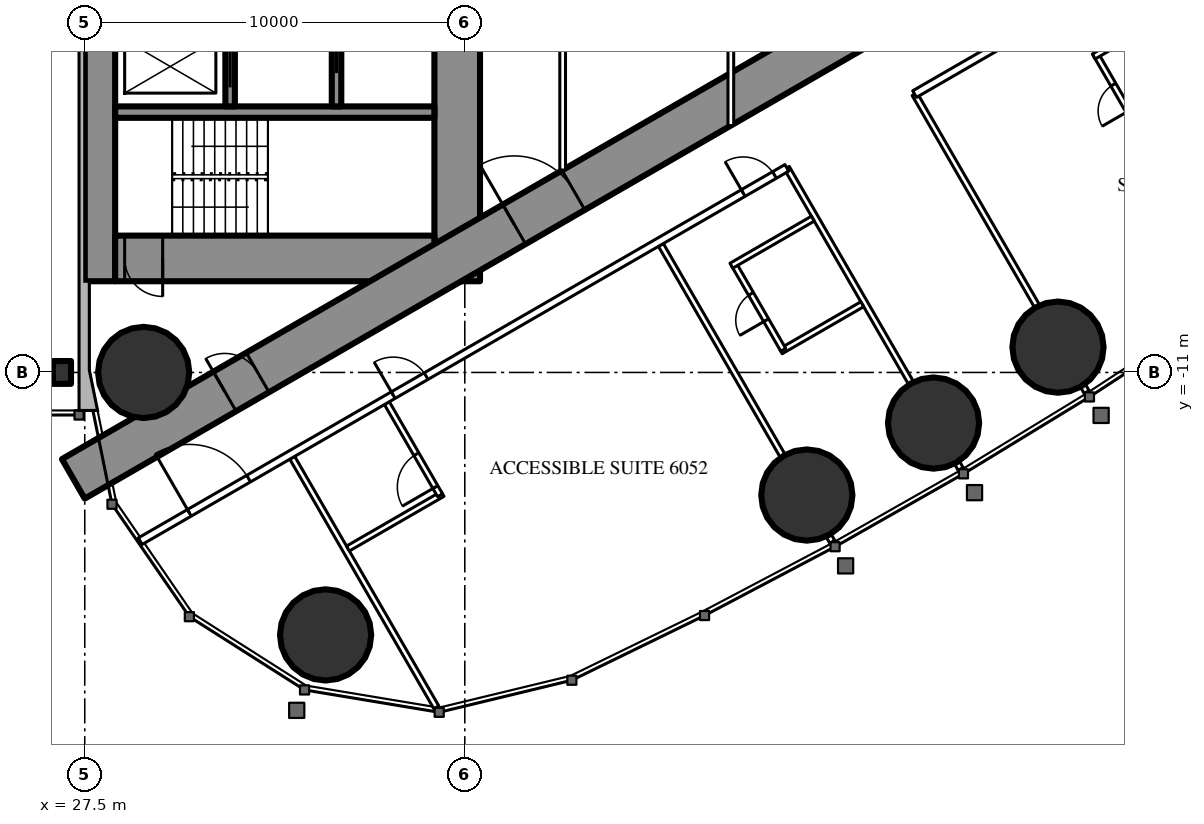
"""IFC4 building model, lengths in metres.
Left out: names, types, materials, properties, quantities, classifications, styles, units other than length and angle.
Written with IfcOpenShell. Run it as: python <this file> out.ifc"""

import sys

from ifc_helpers import new_model, si_unit, direction, frame, frame_2d, origin, origin_2d, place, context, subcontext, project, spatial, rectangle, circle, i_section, extrude, element, fill, save


model = new_model("IFC4")
c1 = context("Model", 3, precision=1e-05, world=origin(), true_north=direction((0.0, 1.0)))
c2 = subcontext(c1, "Body", "Model", "MODEL_VIEW")
j1 = project(units=[si_unit("LENGTHUNIT", "METRE"), si_unit("PLANEANGLEUNIT", "RADIAN")], contexts=[c1])
p1 = place(None, origin())
s1 = spatial("IfcSite", under=j1, at=p1, CompositionType="ELEMENT")
p2 = place(p1, origin())
s2 = spatial("IfcBuilding", under=s1, at=p2, CompositionType="ELEMENT")
p3 = place(p2, frame((0.0, 0.0, 226.1)))
s3 = spatial("IfcBuildingStorey", under=s2, at=p3, CompositionType="ELEMENT", Elevation=226.1)
for number, where, z_axis, x_axis in (
    (1, (33.837, -17.906, 0.0), (0.0, 0.0, 1.0), (1.0, 0.0, 0.0)),
    (2, (29.05, -11.0, 0.0), (0.0, 0.0, 1.0), (1.0, 0.0, 0.0)),
    (3, (46.499, -14.226, 0.0), (0.0, 0.0, 1.0), (1.0, 0.0, 0.0)),
    (4, (49.834, -12.332, 0.0), (0.0, 0.0, 1.0), (1.0, 0.0, 0.0)),
    (5, (53.108, -10.334, 0.0), (0.0, 0.0, 1.0), (1.0, 0.0, 0.0)),
):
    element("IfcColumn", number, at=place(p3, frame(where, z_axis=z_axis, x_axis=x_axis)), inside=s3, PredefinedType="COLUMN", context=c2, shape_type="SweptSolid", body=[
        extrude(circle(Radius=1.2, at=origin_2d()), origin(), (0.0, 0.0, 1.0), 3.6),
    ])
p4 = place(p3, frame((27.9, -8.6, 0.0), z_axis=(0.0, 0.0, 1.0), x_axis=(0.0, 1.0, 0.0)))
e6 = element("IfcWall", 6, at=p4, inside=s3, PredefinedType="SHEAR", context=c2, shape_type="SweptSolid", body=[
    extrude(rectangle(XDim=17.2, YDim=0.8, at=frame_2d((8.6, 0.0))), origin(), (0.0, 0.0, 1.0), 3.6),
])
p5 = place(p4, frame((9.35, 0.0, 0.0)))
e7 = element("IfcOpeningElement", 7, at=p5, cuts=e6, PredefinedType="OPENING", context=c2, shape_type="SweptSolid", body=[
    extrude(rectangle(XDim=0.9, YDim=2.2, at=frame_2d((0.45, 1.1))), frame((0.0, 0.41, 0.0), z_axis=(0.0, -1.0, 0.0), x_axis=(1.0, 0.0, 0.0)), (0.0, 0.0, 1.0), 0.82),
])
p6 = place(p3, frame((37.3, -8.6, 0.0), z_axis=(0.0, 0.0, 1.0), x_axis=(0.0, 1.0, 0.0)))
e8 = element("IfcWall", 8, at=p6, inside=s3, PredefinedType="SHEAR", context=c2, shape_type="SweptSolid", body=[
    extrude(rectangle(XDim=17.2, YDim=1.2, at=frame_2d((8.6, 0.0))), origin(), (0.0, 0.0, 1.0), 3.6),
])
p7 = place(p6, frame((7.7, 0.0, 0.0)))
e9 = element("IfcOpeningElement", 9, at=p7, cuts=e8, PredefinedType="OPENING", context=c2, shape_type="SweptSolid", body=[
    extrude(rectangle(XDim=1.8, YDim=2.2, at=frame_2d((0.9, 1.1))), frame((0.0, 0.61, 0.0), z_axis=(0.0, -1.0, 0.0), x_axis=(1.0, 0.0, 0.0)), (0.0, 0.0, 1.0), 1.22),
])
p8 = place(p3, frame((28.3, -8.0, 0.0), z_axis=(0.0, 0.0, 1.0), x_axis=(1.0, 0.0, 0.0)))
e10 = element("IfcWall", 10, at=p8, inside=s3, PredefinedType="SHEAR", context=c2, shape_type="SweptSolid", body=[
    extrude(rectangle(XDim=8.4, YDim=1.2, at=frame_2d((4.2, 0.0))), origin(), (0.0, 0.0, 1.0), 3.6),
])
p9 = place(p8, frame((0.25, 0.0, 0.0)))
e11 = element("IfcOpeningElement", 11, at=p9, cuts=e10, PredefinedType="OPENING", context=c2, shape_type="SweptSolid", body=[
    extrude(rectangle(XDim=1.0, YDim=2.2, at=frame_2d((0.5, 1.1))), frame((0.0, 0.61, 0.0), z_axis=(0.0, -1.0, 0.0), x_axis=(1.0, 0.0, 0.0)), (0.0, 0.0, 1.0), 1.22),
])
p10 = place(p3, frame((28.3, -4.15, 0.0), z_axis=(0.0, 0.0, 1.0), x_axis=(1.0, 0.0, 0.0)))
e12 = element("IfcWall", 12, at=p10, inside=s3, PredefinedType="SHEAR", context=c2, shape_type="SweptSolid", body=[
    extrude(rectangle(XDim=8.4, YDim=0.3, at=frame_2d((4.2, 0.0))), origin(), (0.0, 0.0, 1.0), 3.6),
])
p11 = place(p3, frame((31.325, -4.0, 0.0), z_axis=(0.0, 0.0, 1.0), x_axis=(0.0, 1.0, 0.0)))
e13 = element("IfcWall", 13, at=p11, inside=s3, PredefinedType="SHEAR", context=c2, shape_type="SweptSolid", body=[
    extrude(rectangle(XDim=2.1, YDim=0.25, at=frame_2d((1.05, 0.0))), origin(), (0.0, 0.0, 1.0), 3.6),
])
p12 = place(p11, frame((0.5, 0.0, 0.0)))
e14 = element("IfcOpeningElement", 14, at=p12, cuts=e13, PredefinedType="OPENING", context=c2, shape_type="SweptSolid", body=[
    extrude(rectangle(XDim=1.1, YDim=2.2, at=frame_2d((0.55, 1.1))), frame((0.0, 0.135, 0.0), z_axis=(0.0, -1.0, 0.0), x_axis=(1.0, 0.0, 0.0)), (0.0, 0.0, 1.0), 0.27),
])
p13 = place(p3, frame((34.125, -4.0, 0.0), z_axis=(0.0, 0.0, 1.0), x_axis=(0.0, 1.0, 0.0)))
e15 = element("IfcWall", 15, at=p13, inside=s3, PredefinedType="SHEAR", context=c2, shape_type="SweptSolid", body=[
    extrude(rectangle(XDim=2.35, YDim=0.25, at=frame_2d((1.175, 0.0))), origin(), (0.0, 0.0, 1.0), 3.6),
])
p14 = place(p13, frame((0.875, 0.0, 0.0)))
e16 = element("IfcOpeningElement", 16, at=p14, cuts=e15, PredefinedType="OPENING", context=c2, shape_type="SweptSolid", body=[
    extrude(rectangle(XDim=0.6, YDim=2.0, at=frame_2d((0.3, 1.0))), frame((0.0, 0.135, 0.0), z_axis=(0.0, -1.0, 0.0), x_axis=(1.0, 0.0, 0.0)), (0.0, 0.0, 1.0), 0.27),
])
p15 = place(p3, frame((27.2, -13.8, 0.0), z_axis=(0.0, 0.0, 1.0), x_axis=(0.866027159892, 0.499996958321, 0.0)))
e17 = element("IfcWall", 17, at=p15, inside=s3, PredefinedType="SHEAR", context=c2, shape_type="SweptSolid", body=[
    extrude(rectangle(XDim=27.947, YDim=1.2, at=frame_2d((13.973, 0.0))), origin(), (0.0, 0.0, 1.0), 3.6),
])
p16 = place(p15, frame((4.6, 0.0, 0.0)))
e18 = element("IfcOpeningElement", 18, at=p16, cuts=e17, PredefinedType="OPENING", context=c2, shape_type="SweptSolid", body=[
    extrude(rectangle(XDim=1.0, YDim=2.2, at=frame_2d((0.5, 1.1))), frame((0.0, 0.61, 0.0), z_axis=(0.0, -1.0, 0.0), x_axis=(1.0, 0.0, 0.0)), (0.0, 0.0, 1.0), 1.22),
])
p17 = place(p15, frame((13.395, 0.0, 0.0)))
e19 = element("IfcOpeningElement", 19, at=p17, cuts=e17, PredefinedType="OPENING", context=c2, shape_type="SweptSolid", body=[
    extrude(rectangle(XDim=1.8, YDim=2.2, at=frame_2d((0.9, 1.1))), frame((0.0, 0.61, 0.0), z_axis=(0.0, -1.0, 0.0), x_axis=(1.0, 0.0, 0.0)), (0.0, 0.0, 1.0), 1.22),
])
p18 = place(p3, frame((26.9, -11.0, 0.0), z_axis=(0.0, 0.0, 1.0), x_axis=(1.0, 0.0, 0.0)))
e20 = element("IfcColumn", 20, at=p18, inside=s3, PredefinedType="COLUMN", context=c2, shape_type="SweptSolid", body=[
    extrude(i_section(OverallWidth=0.476, OverallDepth=0.6, WebThickness=0.1, FlangeThickness=0.14, FilletRadius=0.02, at=origin_2d()), origin(), (0.0, 0.0, 1.0), 3.6),
])
p19 = place(p3, frame((32.96, -13.246, 0.0), z_axis=(0.0, 0.0, 1.0), x_axis=(0.500000236886, -0.866025267018, 0.0)))
e21 = element("IfcWall", 21, at=p19, inside=s3, PredefinedType="PARTITIONING", context=c2, shape_type="SweptSolid", body=[
    extrude(rectangle(XDim=7.583, YDim=0.15, at=frame_2d((3.791, 0.0))), origin(), (0.0, 0.0, 1.0), 3.35),
])
p20 = place(p3, frame((42.66, -7.646, 0.0), z_axis=(0.0, 0.0, 1.0), x_axis=(0.499996592859, -0.866027370889, 0.0)))
e22 = element("IfcWall", 22, at=p20, inside=s3, PredefinedType="PARTITIONING", context=c2, shape_type="SweptSolid", body=[
    extrude(rectangle(XDim=6.398, YDim=0.15, at=frame_2d((3.199, 0.0))), origin(), (0.0, 0.0, 1.0), 2.45),
])
p21 = place(p3, frame((47.079, -15.3, 0.0), z_axis=(0.0, 0.0, 1.0), x_axis=(0.499212083968, -0.866479829667, 0.0)))
e23 = element("IfcWall", 23, at=p21, inside=s3, PredefinedType="PARTITIONING", context=c2, shape_type="SweptSolid", body=[
    extrude(rectangle(XDim=0.179, YDim=0.15, at=frame_2d((0.09, 0.0))), origin(), (0.0, 0.0, 1.0), 2.45),
])
p22 = place(p3, frame((45.973, -5.617, 0.0), z_axis=(0.0, 0.0, 1.0), x_axis=(0.499985856986, -0.866033569104, 0.0)))
e24 = element("IfcWall", 24, at=p22, inside=s3, PredefinedType="PARTITIONING", context=c2, shape_type="SweptSolid", body=[
    extrude(rectangle(XDim=6.526, YDim=0.15, at=frame_2d((3.263, 0.0))), origin(), (0.0, 0.0, 1.0), 2.45),
])
p23 = place(p3, frame((50.456, -13.382, 0.0), z_axis=(0.0, 0.0, 1.0), x_axis=(0.500661834965, -0.865642955848, 0.0)))
e25 = element("IfcWall", 25, at=p23, inside=s3, PredefinedType="PARTITIONING", context=c2, shape_type="SweptSolid", body=[
    extrude(rectangle(XDim=0.18, YDim=0.15, at=frame_2d((0.09, 0.0))), origin(), (0.0, 0.0, 1.0), 2.45),
])
p24 = place(p3, frame((49.335, -3.676, 0.0), z_axis=(0.0, 0.0, 1.0), x_axis=(0.500000613642, -0.866025049498, 0.0)))
e26 = element("IfcWall", 26, at=p24, inside=s3, PredefinedType="PARTITIONING", context=c2, shape_type="SweptSolid", body=[
    extrude(rectangle(XDim=6.433, YDim=0.15, at=frame_2d((3.216, 0.0))), origin(), (0.0, 0.0, 1.0), 2.45),
])
p25 = place(p3, frame((53.771, -11.36, 0.0), z_axis=(0.0, 0.0, 1.0), x_axis=(0.499524978789, -0.866299483762, 0.0)))
e27 = element("IfcWall", 27, at=p25, inside=s3, PredefinedType="PARTITIONING", context=c2, shape_type="SweptSolid", body=[
    extrude(rectangle(XDim=0.178, YDim=0.15, at=frame_2d((0.089, 0.0))), origin(), (0.0, 0.0, 1.0), 2.45),
])
p26 = place(p3, frame((34.425, -15.633, 0.0), z_axis=(0.0, 0.0, 1.0), x_axis=(0.866018712932, 0.500011588718, 0.0)))
e28 = element("IfcWall", 28, at=p26, inside=s3, PredefinedType="PARTITIONING", context=c2, shape_type="SweptSolid", body=[
    extrude(rectangle(XDim=2.875, YDim=0.15, at=frame_2d((1.438, 0.0))), origin(), (0.0, 0.0, 1.0), 3.35),
])
p27 = place(p3, frame((35.45, -11.808, 0.0), z_axis=(0.0, 0.0, 1.0), x_axis=(0.49994636267, -0.866056369097, 0.0)))
e29 = element("IfcWall", 29, at=p27, inside=s3, PredefinedType="PARTITIONING", context=c2, shape_type="SweptSolid", body=[
    extrude(rectangle(XDim=2.8, YDim=0.15, at=frame_2d((1.4, 0.0))), origin(), (0.0, 0.0, 1.0), 3.35),
])
p28 = place(p27, frame((1.55, 0.0, 0.0)))
e30 = element("IfcOpeningElement", 30, at=p28, cuts=e29, PredefinedType="OPENING", context=c2, shape_type="SweptSolid", body=[
    extrude(rectangle(XDim=1.0, YDim=2.2, at=frame_2d((0.5, 1.1))), frame((0.0, 0.085, 0.0), z_axis=(0.0, -1.0, 0.0), x_axis=(1.0, 0.0, 0.0)), (0.0, 0.0, 1.0), 0.17),
])
p29 = place(p3, frame((45.814, -10.443, 0.0), z_axis=(0.0, 0.0, 1.0), x_axis=(0.866073894602, 0.499916002032, 0.0)))
e31 = element("IfcWall", 31, at=p29, inside=s3, PredefinedType="PARTITIONING", context=c2, shape_type="SweptSolid", body=[
    extrude(rectangle(XDim=2.475, YDim=0.15, at=frame_2d((1.238, 0.0))), origin(), (0.0, 0.0, 1.0), 3.35),
])
p30 = place(p3, frame((44.579, -8.154, 0.0), z_axis=(0.0, 0.0, 1.0), x_axis=(0.500006934395, -0.866021400173, 0.0)))
e32 = element("IfcWall", 32, at=p30, inside=s3, PredefinedType="PARTITIONING", context=c2, shape_type="SweptSolid", body=[
    extrude(rectangle(XDim=2.6, YDim=0.15, at=frame_2d((1.3, 0.0))), origin(), (0.0, 0.0, 1.0), 3.35),
])
p31 = place(p30, frame((0.9, 0.0, 0.0)))
e33 = element("IfcOpeningElement", 33, at=p31, cuts=e32, PredefinedType="OPENING", context=c2, shape_type="SweptSolid", body=[
    extrude(rectangle(XDim=0.8, YDim=2.2, at=frame_2d((0.4, 1.1))), frame((0.0, 0.085, 0.0), z_axis=(0.0, -1.0, 0.0), x_axis=(1.0, 0.0, 0.0)), (0.0, 0.0, 1.0), 0.17),
])
p32 = place(p3, frame((44.514, -8.191, 0.0), z_axis=(0.0, 0.0, 1.0), x_axis=(0.866031185235, 0.4999899861, 0.0)))
e34 = element("IfcWall", 34, at=p32, inside=s3, PredefinedType="PARTITIONING", context=c2, shape_type="SweptSolid", body=[
    extrude(rectangle(XDim=2.475, YDim=0.15, at=frame_2d((1.238, 0.0))), origin(), (0.0, 0.0, 1.0), 3.35),
])
p33 = place(p3, frame((54.114, -2.649, 0.0), z_axis=(0.0, 0.0, 1.0), x_axis=(0.500006934395, -0.866021400173, 0.0)))
e35 = element("IfcWall", 35, at=p33, inside=s3, PredefinedType="PARTITIONING", context=c2, shape_type="SweptSolid", body=[
    extrude(rectangle(XDim=2.6, YDim=0.15, at=frame_2d((1.3, 0.0))), origin(), (0.0, 0.0, 1.0), 3.35),
])
p34 = place(p33, frame((0.9, 0.0, 0.0)))
e36 = element("IfcOpeningElement", 36, at=p34, cuts=e35, PredefinedType="OPENING", context=c2, shape_type="SweptSolid", body=[
    extrude(rectangle(XDim=0.8, YDim=2.2, at=frame_2d((0.4, 1.1))), frame((0.0, 0.085, 0.0), z_axis=(0.0, -1.0, 0.0), x_axis=(1.0, 0.0, 0.0)), (0.0, 0.0, 1.0), 0.17),
])
p35 = place(p3, frame((54.049, -2.687, 0.0), z_axis=(0.0, 0.0, 1.0), x_axis=(0.866006523861, 0.500032699561, 0.0)))
e37 = element("IfcWall", 37, at=p35, inside=s3, PredefinedType="PARTITIONING", context=c2, shape_type="SweptSolid", body=[
    extrude(rectangle(XDim=2.475, YDim=0.15, at=frame_2d((1.237, 0.0))), origin(), (0.0, 0.0, 1.0), 3.35),
])
p36 = place(p3, frame((28.959, -15.44, 0.0), z_axis=(0.0, 0.0, 1.0), x_axis=(0.866025204199, 0.500000345692, 0.0)))
e38 = element("IfcWall", 38, at=p36, inside=s3, PredefinedType="PARTITIONING", context=c2, shape_type="SweptSolid", body=[
    extrude(rectangle(XDim=19.646, YDim=0.2, at=frame_2d((9.823, 0.0))), origin(), (0.0, 0.0, 1.0), 3.35),
])
p37 = place(p36, frame((1.494, 0.0, 0.0)))
e39 = element("IfcOpeningElement", 39, at=p37, cuts=e38, PredefinedType="OPENING", context=c2, shape_type="SweptSolid", body=[
    extrude(rectangle(XDim=1.8, YDim=2.04, at=frame_2d((0.9, 1.02))), frame((0.0, 0.11, 0.0), z_axis=(0.0, -1.0, 0.0), x_axis=(1.0, 0.0, 0.0)), (0.0, 0.0, 1.0), 0.22),
])
p38 = place(p36, frame((7.687, 0.0, 0.0)))
e40 = element("IfcOpeningElement", 40, at=p38, cuts=e38, PredefinedType="OPENING", context=c2, shape_type="SweptSolid", body=[
    extrude(rectangle(XDim=1.0, YDim=2.2, at=frame_2d((0.5, 1.1))), frame((0.0, 0.11, 0.0), z_axis=(0.0, -1.0, 0.0), x_axis=(1.0, 0.0, 0.0)), (0.0, 0.0, 1.0), 0.22),
])
p39 = place(p36, frame((18.321, 0.0, 0.0)))
e41 = element("IfcOpeningElement", 41, at=p39, cuts=e38, PredefinedType="OPENING", context=c2, shape_type="SweptSolid", body=[
    extrude(rectangle(XDim=0.95, YDim=2.2, at=frame_2d((0.475, 1.1))), frame((0.0, 0.11, 0.0), z_axis=(0.0, -1.0, 0.0), x_axis=(1.0, 0.0, 0.0)), (0.0, 0.0, 1.0), 0.22),
])
p40 = place(p3, frame((49.335, -3.676, 0.0), z_axis=(0.0, 0.0, 1.0), x_axis=(0.866021344046, 0.500007031608, 0.0)))
e42 = element("IfcWall", 42, at=p40, inside=s3, PredefinedType="PARTITIONING", context=c2, shape_type="SweptSolid", body=[
    extrude(rectangle(XDim=7.352, YDim=0.2, at=frame_2d((3.676, 0.0))), origin(), (0.0, 0.0, 1.0), 3.35),
])
p41 = place(p40, frame((5.802, 0.0, 0.0)))
e43 = element("IfcOpeningElement", 43, at=p41, cuts=e42, PredefinedType="OPENING", context=c2, shape_type="SweptSolid", body=[
    extrude(rectangle(XDim=0.95, YDim=2.2, at=frame_2d((0.475, 1.1))), frame((0.0, 0.11, 0.0), z_axis=(0.0, -1.0, 0.0), x_axis=(1.0, 0.0, 0.0)), (0.0, 0.0, 1.0), 0.22),
])
p42 = place(p3, frame((40.075, -5.674, 0.0), z_axis=(0.0, 0.0, 1.0), x_axis=(0.0, 1.0, 0.0)))
e44 = element("IfcWall", 44, at=p42, inside=s3, PredefinedType="PARTITIONING", context=c2, shape_type="SweptSolid", body=[
    extrude(rectangle(XDim=11.348, YDim=0.15, at=frame_2d((5.674, 0.0))), origin(), (0.0, 0.0, 1.0), 3.35),
])
p43 = place(p42, frame((4.774, 0.0, 0.0)))
e45 = element("IfcOpeningElement", 45, at=p43, cuts=e44, PredefinedType="OPENING", context=c2, shape_type="SweptSolid", body=[
    extrude(rectangle(XDim=1.8, YDim=2.2, at=frame_2d((0.9, 1.1))), frame((0.0, 0.085, 0.0), z_axis=(0.0, -1.0, 0.0), x_axis=(1.0, 0.0, 0.0)), (0.0, 0.0, 1.0), 0.17),
])
p44 = place(p3, frame((44.5, -4.505, 0.0), z_axis=(0.0, 0.0, 1.0), x_axis=(0.0, 1.0, 0.0)))
e46 = element("IfcWall", 46, at=p44, inside=s3, PredefinedType="PARTITIONING", context=c2, shape_type="SweptSolid", body=[
    extrude(rectangle(XDim=9.009, YDim=0.15, at=frame_2d((4.505, 0.0))), origin(), (0.0, 0.0, 1.0), 3.35),
])
p45 = place(p44, frame((4.005, 0.0, 0.0)))
e47 = element("IfcOpeningElement", 47, at=p45, cuts=e46, PredefinedType="OPENING", context=c2, shape_type="SweptSolid", body=[
    extrude(rectangle(XDim=1.0, YDim=2.2, at=frame_2d((0.5, 1.1))), frame((0.0, 0.085, 0.0), z_axis=(0.0, -1.0, 0.0), x_axis=(1.0, 0.0, 0.0)), (0.0, 0.0, 1.0), 0.17),
])
p46 = place(p37, origin())
e48 = element("IfcDoor", 48, at=p46, inside=s3, OperationType="DOUBLE_DOOR_SINGLE_SWING", PredefinedType="DOOR", context=c2, shape_type="SweptSolid", body=[
    extrude(rectangle(XDim=1.8, YDim=2.04, at=frame_2d((0.9, 1.02))), frame((0.0, 0.025, 0.0), z_axis=(0.0, -1.0, 0.0), x_axis=(1.0, 0.0, 0.0)), (0.0, 0.0, 1.0), 0.05),
])
fill(e39, e48)
p47 = place(p28, origin())
e49 = element("IfcDoor", 49, at=p47, inside=s3, OperationType="SINGLE_SWING_RIGHT", PredefinedType="DOOR", context=c2, shape_type="SweptSolid", body=[
    extrude(rectangle(XDim=1.0, YDim=2.2, at=frame_2d((0.5, 1.1))), frame((0.0, 0.025, 0.0), z_axis=(0.0, -1.0, 0.0), x_axis=(1.0, 0.0, 0.0)), (0.0, 0.0, 1.0), 0.05),
])
fill(e30, e49)
p48 = place(p38, origin())
e50 = element("IfcDoor", 50, at=p48, inside=s3, OperationType="SINGLE_SWING_LEFT", PredefinedType="DOOR", context=c2, shape_type="SweptSolid", body=[
    extrude(rectangle(XDim=1.0, YDim=2.2, at=frame_2d((0.5, 1.1))), frame((0.0, 0.025, 0.0), z_axis=(0.0, -1.0, 0.0), x_axis=(1.0, 0.0, 0.0)), (0.0, 0.0, 1.0), 0.05),
])
fill(e40, e50)
p49 = place(p31, origin())
e51 = element("IfcDoor", 51, at=p49, inside=s3, OperationType="SINGLE_SWING_RIGHT", PredefinedType="DOOR", context=c2, shape_type="SweptSolid", body=[
    extrude(rectangle(XDim=0.8, YDim=2.2, at=frame_2d((0.4, 1.1))), frame((0.0, 0.025, 0.0), z_axis=(0.0, -1.0, 0.0), x_axis=(1.0, 0.0, 0.0)), (0.0, 0.0, 1.0), 0.05),
])
fill(e33, e51)
p50 = place(p39, origin())
e52 = element("IfcDoor", 52, at=p50, inside=s3, OperationType="SINGLE_SWING_LEFT", PredefinedType="DOOR", context=c2, shape_type="SweptSolid", body=[
    extrude(rectangle(XDim=0.95, YDim=2.2, at=frame_2d((0.475, 1.1))), frame((0.0, 0.025, 0.0), z_axis=(0.0, -1.0, 0.0), x_axis=(1.0, 0.0, 0.0)), (0.0, 0.0, 1.0), 0.05),
])
fill(e41, e52)
p51 = place(p34, origin())
e53 = element("IfcDoor", 53, at=p51, inside=s3, OperationType="SINGLE_SWING_RIGHT", PredefinedType="DOOR", context=c2, shape_type="SweptSolid", body=[
    extrude(rectangle(XDim=0.8, YDim=2.2, at=frame_2d((0.4, 1.1))), frame((0.0, 0.025, 0.0), z_axis=(0.0, -1.0, 0.0), x_axis=(1.0, 0.0, 0.0)), (0.0, 0.0, 1.0), 0.05),
])
fill(e36, e53)
p52 = place(p16, origin())
e54 = element("IfcDoor", 54, at=p52, inside=s3, OperationType="SINGLE_SWING_LEFT", PredefinedType="DOOR", context=c2, shape_type="SweptSolid", body=[
    extrude(rectangle(XDim=1.0, YDim=2.2, at=frame_2d((0.5, 1.1))), frame((0.0, 0.025, 0.0), z_axis=(0.0, -1.0, 0.0), x_axis=(1.0, 0.0, 0.0)), (0.0, 0.0, 1.0), 0.05),
])
fill(e18, e54)
p53 = place(p17, origin())
e55 = element("IfcDoor", 55, at=p53, inside=s3, OperationType="DOUBLE_DOOR_SINGLE_SWING", PredefinedType="DOOR", context=c2, shape_type="SweptSolid", body=[
    extrude(rectangle(XDim=1.8, YDim=2.2, at=frame_2d((0.9, 1.1))), frame((0.0, 0.025, 0.0), z_axis=(0.0, -1.0, 0.0), x_axis=(1.0, 0.0, 0.0)), (0.0, 0.0, 1.0), 0.05),
])
fill(e19, e55)
p54 = place(p9, origin())
e56 = element("IfcDoor", 56, at=p54, inside=s3, OperationType="SINGLE_SWING_RIGHT", PredefinedType="DOOR", context=c2, shape_type="SweptSolid", body=[
    extrude(rectangle(XDim=1.0, YDim=2.2, at=frame_2d((0.5, 1.1))), frame((0.0, 0.025, 0.0), z_axis=(0.0, -1.0, 0.0), x_axis=(1.0, 0.0, 0.0)), (0.0, 0.0, 1.0), 0.05),
])
fill(e11, e56)
p55 = place(p12, origin())
e57 = element("IfcDoor", 57, at=p55, inside=s3, OperationType="SLIDING_TO_LEFT", PredefinedType="USERDEFINED", context=c2, shape_type="SweptSolid", body=[
    extrude(rectangle(XDim=1.1, YDim=2.2, at=frame_2d((0.55, 1.1))), frame((0.0, 0.025, 0.0), z_axis=(0.0, -1.0, 0.0), x_axis=(1.0, 0.0, 0.0)), (0.0, 0.0, 1.0), 0.05),
])
fill(e14, e57)
p56 = place(p14, origin())
e58 = element("IfcDoor", 58, at=p56, inside=s3, OperationType="SLIDING_TO_LEFT", PredefinedType="DOOR", context=c2, shape_type="SweptSolid", body=[
    extrude(rectangle(XDim=0.6, YDim=2.0, at=frame_2d((0.3, 1.0))), frame((0.0, 0.025, 0.0), z_axis=(0.0, -1.0, 0.0), x_axis=(1.0, 0.0, 0.0)), (0.0, 0.0, 1.0), 0.05),
])
fill(e16, e58)
save(model, sys.argv[1])
